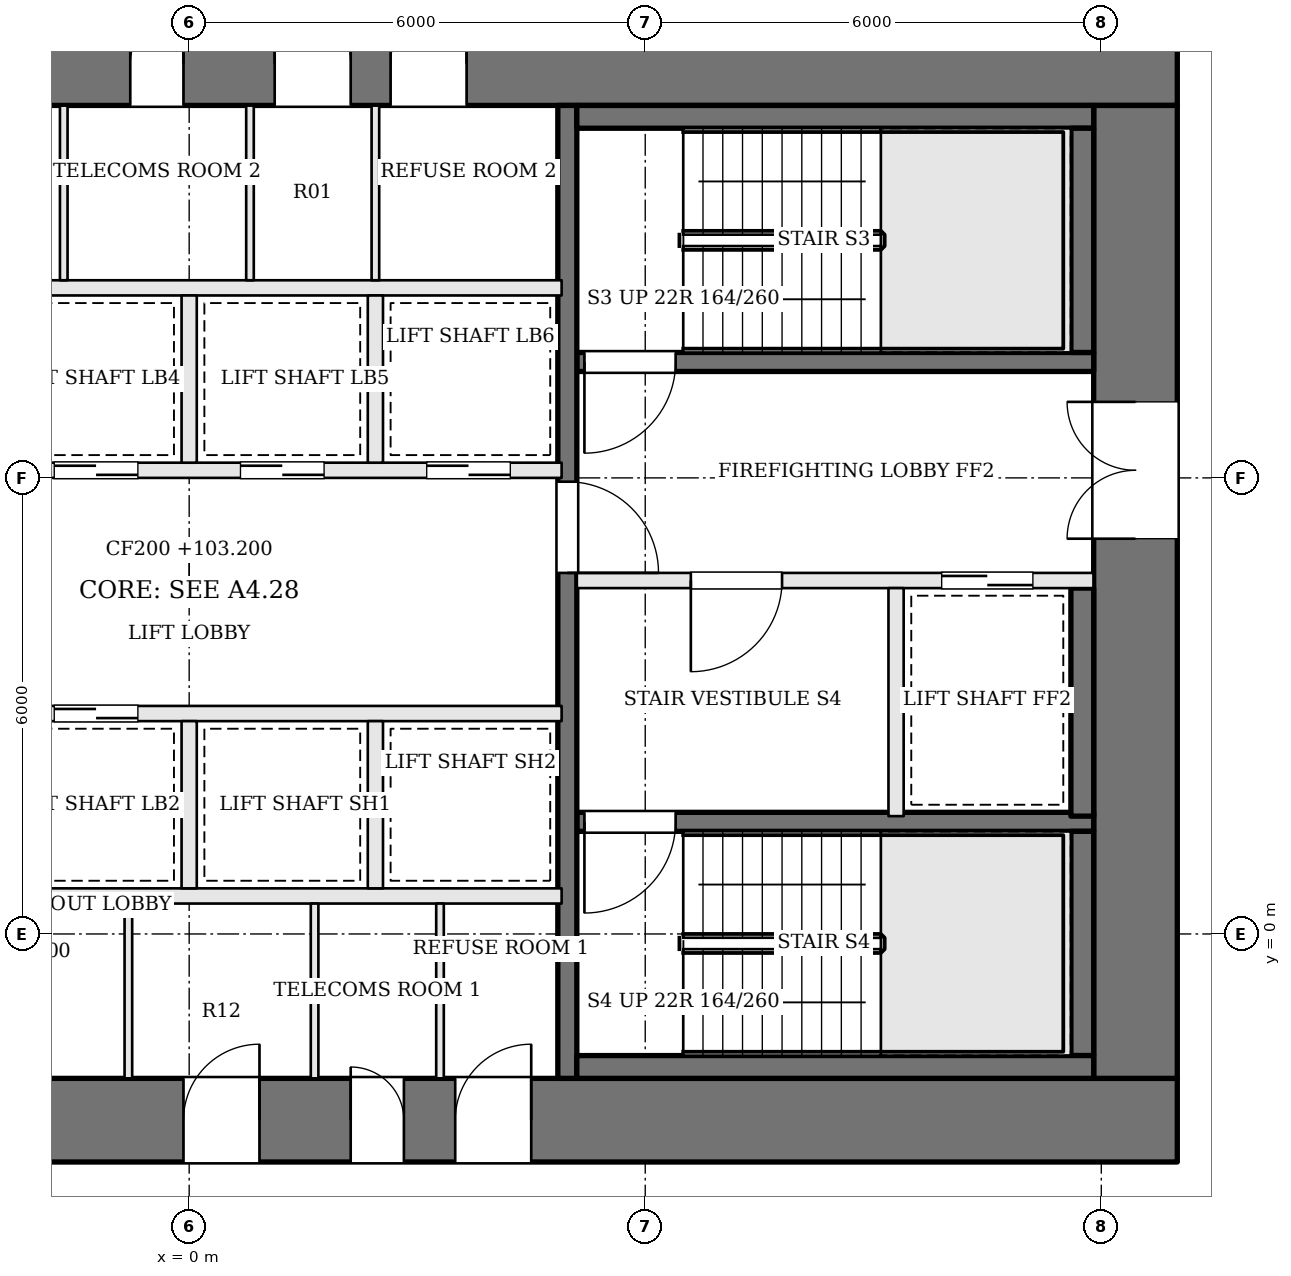
"""IFC4 building model, lengths in metres.
Left out: names, types, materials, properties, quantities, classifications, styles, units other than length and angle.
Written with IfcOpenShell. Run it as: python <this file> out.ifc"""

import sys

from ifc_helpers import new_model, si_unit, direction, frame, frame_2d, origin, place, context, subcontext, project, spatial, rectangle, extrude, element, fill, save


model = new_model("IFC4")
c1 = context("Model", 3, precision=1e-05, world=origin(), true_north=direction((0.0, 1.0)))
c2 = subcontext(c1, "Body", "Model", "MODEL_VIEW")
j1 = project(units=[si_unit("LENGTHUNIT", "METRE"), si_unit("PLANEANGLEUNIT", "RADIAN")], contexts=[c1])
p1 = place(None, origin())
s1 = spatial("IfcSite", under=j1, at=p1, CompositionType="ELEMENT")
p2 = place(p1, origin())
s2 = spatial("IfcBuilding", under=s1, at=p2, CompositionType="ELEMENT")
p3 = place(p2, frame((0.0, 0.0, 103.2)))
s3 = spatial("IfcBuildingStorey", under=s2, at=p3, CompositionType="ELEMENT", Elevation=103.2)
p4 = place(p3, frame((-13.0, 11.45, 0.0), z_axis=(0.0, 0.0, 1.0), x_axis=(1.0, 0.0, 0.0)))
e1 = element("IfcWall", 1, at=p4, inside=s3, PredefinedType="SHEAR", context=c2, shape_type="SweptSolid", body=[
    extrude(rectangle(XDim=26.0, YDim=1.1, at=frame_2d((13.0, 0.0))), origin(), (0.0, 0.0, 1.0), 3.6),
])
p5 = place(p4, frame((9.225, 0.0, 0.0)))
e2 = element("IfcOpeningElement", 2, at=p5, cuts=e1, PredefinedType="OPENING", context=c2, shape_type="SweptSolid", body=[
    extrude(rectangle(XDim=1.0, YDim=2.1, at=frame_2d((0.5, 1.05))), frame((0.0, 0.56, 0.0), z_axis=(0.0, -1.0, 0.0), x_axis=(1.0, 0.0, 0.0)), (0.0, 0.0, 1.0), 1.12),
])
p6 = place(p4, frame((12.225, 0.0, 0.0)))
e3 = element("IfcOpeningElement", 3, at=p6, cuts=e1, PredefinedType="OPENING", context=c2, shape_type="SweptSolid", body=[
    extrude(rectangle(XDim=0.7, YDim=2.1, at=frame_2d((0.35, 1.05))), frame((0.0, 0.56, 0.0), z_axis=(0.0, -1.0, 0.0), x_axis=(1.0, 0.0, 0.0)), (0.0, 0.0, 1.0), 1.12),
])
p7 = place(p4, frame((14.125, 0.0, 0.0)))
e4 = element("IfcOpeningElement", 4, at=p7, cuts=e1, PredefinedType="OPENING", context=c2, shape_type="SweptSolid", body=[
    extrude(rectangle(XDim=1.0, YDim=2.1, at=frame_2d((0.5, 1.05))), frame((0.0, 0.56, 0.0), z_axis=(0.0, -1.0, 0.0), x_axis=(1.0, 0.0, 0.0)), (0.0, 0.0, 1.0), 1.12),
])
p8 = place(p4, frame((15.65, 0.0, 0.0)))
e5 = element("IfcOpeningElement", 5, at=p8, cuts=e1, PredefinedType="OPENING", context=c2, shape_type="SweptSolid", body=[
    extrude(rectangle(XDim=1.0, YDim=2.1, at=frame_2d((0.5, 1.05))), frame((0.0, 0.56, 0.0), z_axis=(0.0, -1.0, 0.0), x_axis=(1.0, 0.0, 0.0)), (0.0, 0.0, 1.0), 1.12),
])
p9 = place(p3, frame((-13.0, -2.45, 0.0), z_axis=(0.0, 0.0, 1.0), x_axis=(1.0, 0.0, 0.0)))
e6 = element("IfcWall", 6, at=p9, inside=s3, PredefinedType="SHEAR", context=c2, shape_type="SweptSolid", body=[
    extrude(rectangle(XDim=26.0, YDim=1.1, at=frame_2d((13.0, 0.0))), origin(), (0.0, 0.0, 1.0), 3.6),
])
p10 = place(p9, frame((9.65, 0.0, 0.0)))
e7 = element("IfcOpeningElement", 7, at=p10, cuts=e6, PredefinedType="OPENING", context=c2, shape_type="SweptSolid", body=[
    extrude(rectangle(XDim=1.0, YDim=2.1, at=frame_2d((0.5, 1.05))), frame((0.0, 0.56, 0.0), z_axis=(0.0, -1.0, 0.0), x_axis=(1.0, 0.0, 0.0)), (0.0, 0.0, 1.0), 1.12),
])
p11 = place(p9, frame((12.925, 0.0, 0.0)))
e8 = element("IfcOpeningElement", 8, at=p11, cuts=e6, PredefinedType="OPENING", context=c2, shape_type="SweptSolid", body=[
    extrude(rectangle(XDim=1.0, YDim=2.1, at=frame_2d((0.5, 1.05))), frame((0.0, 0.56, 0.0), z_axis=(0.0, -1.0, 0.0), x_axis=(1.0, 0.0, 0.0)), (0.0, 0.0, 1.0), 1.12),
])
p12 = place(p9, frame((15.125, 0.0, 0.0)))
e9 = element("IfcOpeningElement", 9, at=p12, cuts=e6, PredefinedType="OPENING", context=c2, shape_type="SweptSolid", body=[
    extrude(rectangle(XDim=0.7, YDim=2.1, at=frame_2d((0.35, 1.05))), frame((0.0, 0.56, 0.0), z_axis=(0.0, -1.0, 0.0), x_axis=(1.0, 0.0, 0.0)), (0.0, 0.0, 1.0), 1.12),
])
p13 = place(p9, frame((16.5, 0.0, 0.0)))
e10 = element("IfcOpeningElement", 10, at=p13, cuts=e6, PredefinedType="OPENING", context=c2, shape_type="SweptSolid", body=[
    extrude(rectangle(XDim=1.0, YDim=2.1, at=frame_2d((0.5, 1.05))), frame((0.0, 0.56, 0.0), z_axis=(0.0, -1.0, 0.0), x_axis=(1.0, 0.0, 0.0)), (0.0, 0.0, 1.0), 1.12),
])
p14 = place(p3, frame((12.45, -1.9, 0.0), z_axis=(0.0, 0.0, 1.0), x_axis=(0.0, 1.0, 0.0)))
e11 = element("IfcWall", 11, at=p14, inside=s3, PredefinedType="SHEAR", context=c2, shape_type="SweptSolid", body=[
    extrude(rectangle(XDim=12.8, YDim=1.1, at=frame_2d((6.4, 0.0))), origin(), (0.0, 0.0, 1.0), 3.6),
])
p15 = place(p14, frame((7.1, 0.0, 0.0)))
e12 = element("IfcOpeningElement", 12, at=p15, cuts=e11, PredefinedType="OPENING", context=c2, shape_type="SweptSolid", body=[
    extrude(rectangle(XDim=1.8, YDim=2.1, at=frame_2d((0.9, 1.05))), frame((0.0, 0.56, 0.0), z_axis=(0.0, -1.0, 0.0), x_axis=(1.0, 0.0, 0.0)), (0.0, 0.0, 1.0), 1.12),
])
p16 = place(p3, frame((11.9, 7.525, 0.0), z_axis=(0.0, 0.0, 1.0), x_axis=(-1.0, 0.0, 0.0)))
e13 = element("IfcWall", 13, at=p16, inside=s3, PredefinedType="SOLIDWALL", context=c2, shape_type="SweptSolid", body=[
    extrude(rectangle(XDim=6.8, YDim=0.25, at=frame_2d((3.4, 0.0))), origin(), (0.0, 0.0, 1.0), 3.4),
])
p17 = place(p16, frame((5.5, 0.0, 0.0)))
e14 = element("IfcOpeningElement", 14, at=p17, cuts=e13, PredefinedType="OPENING", context=c2, shape_type="SweptSolid", body=[
    extrude(rectangle(XDim=1.2, YDim=2.1, at=frame_2d((0.6, 1.05))), frame((0.0, 0.135, 0.0), z_axis=(0.0, -1.0, 0.0), x_axis=(1.0, 0.0, 0.0)), (0.0, 0.0, 1.0), 0.27),
])
p18 = place(p3, frame((11.9, 4.65, 0.0), z_axis=(0.0, 0.0, 1.0), x_axis=(-1.0, 0.0, 0.0)))
e15 = element("IfcWall", 15, at=p18, inside=s3, PredefinedType="SOLIDWALL", context=c2, shape_type="SweptSolid", body=[
    extrude(rectangle(XDim=6.8, YDim=0.2, at=frame_2d((3.4, 0.0))), origin(), (0.0, 0.0, 1.0), 3.4),
])
p19 = place(p18, frame((4.1, 0.0, 0.0)))
e16 = element("IfcOpeningElement", 16, at=p19, cuts=e15, PredefinedType="OPENING", context=c2, shape_type="SweptSolid", body=[
    extrude(rectangle(XDim=1.2, YDim=2.1, at=frame_2d((0.6, 1.05))), frame((0.0, 0.11, 0.0), z_axis=(0.0, -1.0, 0.0), x_axis=(1.0, 0.0, 0.0)), (0.0, 0.0, 1.0), 0.22),
])
p20 = place(p18, frame((0.8, 0.0, 0.0)))
e17 = element("IfcOpeningElement", 17, at=p20, cuts=e15, PredefinedType="OPENING", context=c2, shape_type="SweptSolid", body=[
    extrude(rectangle(XDim=1.2, YDim=2.1, at=frame_2d((0.6, 1.05))), frame((0.0, 0.11, 0.0), z_axis=(0.0, -1.0, 0.0), x_axis=(1.0, 0.0, 0.0)), (0.0, 0.0, 1.0), 0.22),
])
p21 = place(p3, frame((11.9, 1.475, 0.0), z_axis=(0.0, 0.0, 1.0), x_axis=(-1.0, 0.0, 0.0)))
e18 = element("IfcWall", 18, at=p21, inside=s3, PredefinedType="SOLIDWALL", context=c2, shape_type="SweptSolid", body=[
    extrude(rectangle(XDim=6.8, YDim=0.25, at=frame_2d((3.4, 0.0))), origin(), (0.0, 0.0, 1.0), 3.4),
])
p22 = place(p21, frame((5.5, 0.0, 0.0)))
e19 = element("IfcOpeningElement", 19, at=p22, cuts=e18, PredefinedType="OPENING", context=c2, shape_type="SweptSolid", body=[
    extrude(rectangle(XDim=1.2, YDim=2.1, at=frame_2d((0.6, 1.05))), frame((0.0, 0.135, 0.0), z_axis=(0.0, -1.0, 0.0), x_axis=(1.0, 0.0, 0.0)), (0.0, 0.0, 1.0), 0.27),
])
p23 = place(p3, frame((9.3, 4.55, 0.0), z_axis=(0.0, 0.0, 1.0), x_axis=(0.0, -1.0, 0.0)))
e20 = element("IfcWall", 20, at=p23, inside=s3, PredefinedType="SOLIDWALL", context=c2, shape_type="SweptSolid", body=[
    extrude(rectangle(XDim=3.0, YDim=0.2, at=frame_2d((1.5, 0.0))), origin(), (0.0, 0.0, 1.0), 3.4),
])
p24 = place(p3, frame((4.975, 10.9, 0.0), z_axis=(0.0, 0.0, 1.0), x_axis=(0.0, -1.0, 0.0)))
e21 = element("IfcWall", 21, at=p24, inside=s3, PredefinedType="SOLIDWALL", context=c2, shape_type="SweptSolid", body=[
    extrude(rectangle(XDim=12.8, YDim=0.25, at=frame_2d((6.4, 0.0))), origin(), (0.0, 0.0, 1.0), 3.4),
])
p25 = place(p24, frame((4.95, 0.0, 0.0)))
e22 = element("IfcOpeningElement", 22, at=p25, cuts=e21, PredefinedType="OPENING", context=c2, shape_type="SweptSolid", body=[
    extrude(rectangle(XDim=1.2, YDim=2.1, at=frame_2d((0.6, 1.05))), frame((0.0, 0.135, 0.0), z_axis=(0.0, -1.0, 0.0), x_axis=(1.0, 0.0, 0.0)), (0.0, 0.0, 1.0), 0.27),
])
p26 = place(p3, frame((11.9, 10.75, 0.0), z_axis=(0.0, 0.0, 1.0), x_axis=(-1.0, 0.0, 0.0)))
e23 = element("IfcWall", 23, at=p26, inside=s3, PredefinedType="SOLIDWALL", context=c2, shape_type="SweptSolid", body=[
    extrude(rectangle(XDim=6.8, YDim=0.3, at=frame_2d((3.4, 0.0))), origin(), (0.0, 0.0, 1.0), 3.4),
])
p27 = place(p3, frame((11.75, 10.6, 0.0), z_axis=(0.0, 0.0, 1.0), x_axis=(0.0, -1.0, 0.0)))
e24 = element("IfcWall", 24, at=p27, inside=s3, PredefinedType="SOLIDWALL", context=c2, shape_type="SweptSolid", body=[
    extrude(rectangle(XDim=2.95, YDim=0.3, at=frame_2d((1.475, 0.0))), origin(), (0.0, 0.0, 1.0), 3.4),
])
p28 = place(p3, frame((11.75, 4.55, 0.0), z_axis=(0.0, 0.0, 1.0), x_axis=(0.0, -1.0, 0.0)))
e25 = element("IfcWall", 25, at=p28, inside=s3, PredefinedType="SOLIDWALL", context=c2, shape_type="SweptSolid", body=[
    extrude(rectangle(XDim=3.0, YDim=0.3, at=frame_2d((1.5, 0.0))), origin(), (0.0, 0.0, 1.0), 3.4),
])
p29 = place(p3, frame((11.75, 1.35, 0.0), z_axis=(0.0, 0.0, 1.0), x_axis=(0.0, -1.0, 0.0)))
e26 = element("IfcWall", 26, at=p29, inside=s3, PredefinedType="SOLIDWALL", context=c2, shape_type="SweptSolid", body=[
    extrude(rectangle(XDim=2.95, YDim=0.3, at=frame_2d((1.475, 0.0))), origin(), (0.0, 0.0, 1.0), 3.4),
])
p30 = place(p3, frame((11.9, -1.75, 0.0), z_axis=(0.0, 0.0, 1.0), x_axis=(-1.0, 0.0, 0.0)))
e27 = element("IfcWall", 27, at=p30, inside=s3, PredefinedType="SOLIDWALL", context=c2, shape_type="SweptSolid", body=[
    extrude(rectangle(XDim=6.8, YDim=0.3, at=frame_2d((3.4, 0.0))), origin(), (0.0, 0.0, 1.0), 3.4),
])
p31 = place(p3, frame((-4.9, 0.5, 0.0), z_axis=(0.0, 0.0, 1.0), x_axis=(1.0, 0.0, 0.0)))
e28 = element("IfcWall", 28, at=p31, inside=s3, PredefinedType="SOLIDWALL", context=c2, shape_type="SweptSolid", body=[
    extrude(rectangle(XDim=9.8, YDim=0.2, at=frame_2d((4.9, 0.0))), origin(), (0.0, 0.0, 1.0), 3.4),
])
p32 = place(p3, frame((-4.9, 2.9, 0.0), z_axis=(0.0, 0.0, 1.0), x_axis=(1.0, 0.0, 0.0)))
e29 = element("IfcWall", 29, at=p32, inside=s3, PredefinedType="SOLIDWALL", context=c2, shape_type="SweptSolid", body=[
    extrude(rectangle(XDim=9.8, YDim=0.2, at=frame_2d((4.9, 0.0))), origin(), (0.0, 0.0, 1.0), 3.4),
])
p33 = place(p32, frame((0.675, 0.0, 0.0)))
e30 = element("IfcOpeningElement", 30, at=p33, cuts=e29, PredefinedType="OPENING", context=c2, shape_type="SweptSolid", body=[
    extrude(rectangle(XDim=1.1, YDim=2.1, at=frame_2d((0.55, 1.05))), frame((0.0, 0.11, 0.0), z_axis=(0.0, -1.0, 0.0), x_axis=(1.0, 0.0, 0.0)), (0.0, 0.0, 1.0), 0.22),
])
p34 = place(p32, frame((3.125, 0.0, 0.0)))
e31 = element("IfcOpeningElement", 31, at=p34, cuts=e29, PredefinedType="OPENING", context=c2, shape_type="SweptSolid", body=[
    extrude(rectangle(XDim=1.1, YDim=2.1, at=frame_2d((0.55, 1.05))), frame((0.0, 0.11, 0.0), z_axis=(0.0, -1.0, 0.0), x_axis=(1.0, 0.0, 0.0)), (0.0, 0.0, 1.0), 0.22),
])
p35 = place(p3, frame((-4.9, 6.1, 0.0), z_axis=(0.0, 0.0, 1.0), x_axis=(1.0, 0.0, 0.0)))
e32 = element("IfcWall", 32, at=p35, inside=s3, PredefinedType="SOLIDWALL", context=c2, shape_type="SweptSolid", body=[
    extrude(rectangle(XDim=9.8, YDim=0.2, at=frame_2d((4.9, 0.0))), origin(), (0.0, 0.0, 1.0), 3.4),
])
p36 = place(p35, frame((0.675, 0.0, 0.0)))
e33 = element("IfcOpeningElement", 33, at=p36, cuts=e32, PredefinedType="OPENING", context=c2, shape_type="SweptSolid", body=[
    extrude(rectangle(XDim=1.1, YDim=2.1, at=frame_2d((0.55, 1.05))), frame((0.0, 0.11, 0.0), z_axis=(0.0, -1.0, 0.0), x_axis=(1.0, 0.0, 0.0)), (0.0, 0.0, 1.0), 0.22),
])
p37 = place(p35, frame((3.125, 0.0, 0.0)))
e34 = element("IfcOpeningElement", 34, at=p37, cuts=e32, PredefinedType="OPENING", context=c2, shape_type="SweptSolid", body=[
    extrude(rectangle(XDim=1.1, YDim=2.1, at=frame_2d((0.55, 1.05))), frame((0.0, 0.11, 0.0), z_axis=(0.0, -1.0, 0.0), x_axis=(1.0, 0.0, 0.0)), (0.0, 0.0, 1.0), 0.22),
])
p38 = place(p35, frame((5.575, 0.0, 0.0)))
e35 = element("IfcOpeningElement", 35, at=p38, cuts=e32, PredefinedType="OPENING", context=c2, shape_type="SweptSolid", body=[
    extrude(rectangle(XDim=1.1, YDim=2.1, at=frame_2d((0.55, 1.05))), frame((0.0, 0.11, 0.0), z_axis=(0.0, -1.0, 0.0), x_axis=(1.0, 0.0, 0.0)), (0.0, 0.0, 1.0), 0.22),
])
p39 = place(p35, frame((8.025, 0.0, 0.0)))
e36 = element("IfcOpeningElement", 36, at=p39, cuts=e32, PredefinedType="OPENING", context=c2, shape_type="SweptSolid", body=[
    extrude(rectangle(XDim=1.1, YDim=2.1, at=frame_2d((0.55, 1.05))), frame((0.0, 0.11, 0.0), z_axis=(0.0, -1.0, 0.0), x_axis=(1.0, 0.0, 0.0)), (0.0, 0.0, 1.0), 0.22),
])
p40 = place(p3, frame((-4.9, 8.5, 0.0), z_axis=(0.0, 0.0, 1.0), x_axis=(1.0, 0.0, 0.0)))
e37 = element("IfcWall", 37, at=p40, inside=s3, PredefinedType="SOLIDWALL", context=c2, shape_type="SweptSolid", body=[
    extrude(rectangle(XDim=9.8, YDim=0.2, at=frame_2d((4.9, 0.0))), origin(), (0.0, 0.0, 1.0), 3.4),
])
for number, where, z_axis, x_axis in (
    (38, (0.0, 0.6, 0.0), (0.0, 0.0, 1.0), (0.0, 1.0, 0.0)),
    (39, (2.45, 0.6, 0.0), (0.0, 0.0, 1.0), (0.0, 1.0, 0.0)),
    (40, (0.0, 6.2, 0.0), (0.0, 0.0, 1.0), (0.0, 1.0, 0.0)),
    (41, (2.45, 6.2, 0.0), (0.0, 0.0, 1.0), (0.0, 1.0, 0.0)),
):
    element("IfcWall", number, at=place(p3, frame(where, z_axis=z_axis, x_axis=x_axis)), inside=s3, PredefinedType="SOLIDWALL", context=c2, shape_type="SweptSolid", body=[
        extrude(rectangle(XDim=2.2, YDim=0.2, at=frame_2d((1.1, 0.0))), origin(), (0.0, 0.0, 1.0), 3.4),
    ])
for number, where, z_axis, x_axis in (
    (42, (-0.8, -1.9, 0.0), (0.0, 0.0, 1.0), (0.0, 1.0, 0.0)),
    (43, (1.65, -1.9, 0.0), (0.0, 0.0, 1.0), (0.0, 1.0, 0.0)),
    (44, (3.3, -1.9, 0.0), (0.0, 0.0, 1.0), (0.0, 1.0, 0.0)),
    (45, (-1.65, 8.6, 0.0), (0.0, 0.0, 1.0), (0.0, 1.0, 0.0)),
    (46, (0.8, 8.6, 0.0), (0.0, 0.0, 1.0), (0.0, 1.0, 0.0)),
    (47, (2.45, 8.6, 0.0), (0.0, 0.0, 1.0), (0.0, 1.0, 0.0)),
):
    element("IfcWall", number, at=place(p3, frame(where, z_axis=z_axis, x_axis=x_axis)), inside=s3, PredefinedType="PARTITIONING", context=c2, shape_type="SweptSolid", body=[
        extrude(rectangle(XDim=2.3, YDim=0.1, at=frame_2d((1.15, 0.0))), origin(), (0.0, 0.0, 1.0), 3.4),
    ])
p41 = place(p15, origin())
e48 = element("IfcDoor", 48, at=p41, inside=s3, OperationType="DOUBLE_DOOR_SINGLE_SWING", PredefinedType="DOOR", context=c2, shape_type="SweptSolid", body=[
    extrude(rectangle(XDim=1.8, YDim=2.1, at=frame_2d((0.9, 1.05))), frame((0.0, 0.025, 0.0), z_axis=(0.0, -1.0, 0.0), x_axis=(1.0, 0.0, 0.0)), (0.0, 0.0, 1.0), 0.05),
])
fill(e12, e48)
p42 = place(p25, origin())
e49 = element("IfcDoor", 49, at=p42, inside=s3, OperationType="SINGLE_SWING_RIGHT", PredefinedType="DOOR", context=c2, shape_type="SweptSolid", body=[
    extrude(rectangle(XDim=1.2, YDim=2.1, at=frame_2d((0.6, 1.05))), frame((0.0, 0.025, 0.0), z_axis=(0.0, -1.0, 0.0), x_axis=(1.0, 0.0, 0.0)), (0.0, 0.0, 1.0), 0.05),
])
fill(e22, e49)
p43 = place(p19, origin())
e50 = element("IfcDoor", 50, at=p43, inside=s3, OperationType="SINGLE_SWING_RIGHT", PredefinedType="DOOR", context=c2, shape_type="SweptSolid", body=[
    extrude(rectangle(XDim=1.2, YDim=2.1, at=frame_2d((0.6, 1.05))), frame((0.0, 0.025, 0.0), z_axis=(0.0, -1.0, 0.0), x_axis=(1.0, 0.0, 0.0)), (0.0, 0.0, 1.0), 0.05),
])
fill(e16, e50)
p44 = place(p17, origin())
e51 = element("IfcDoor", 51, at=p44, inside=s3, OperationType="SINGLE_SWING_RIGHT", PredefinedType="DOOR", context=c2, shape_type="SweptSolid", body=[
    extrude(rectangle(XDim=1.2, YDim=2.1, at=frame_2d((0.6, 1.05))), frame((0.0, 0.025, 0.0), z_axis=(0.0, -1.0, 0.0), x_axis=(1.0, 0.0, 0.0)), (0.0, 0.0, 1.0), 0.05),
])
fill(e14, e51)
p45 = place(p22, origin())
e52 = element("IfcDoor", 52, at=p45, inside=s3, OperationType="SINGLE_SWING_RIGHT", PredefinedType="DOOR", context=c2, shape_type="SweptSolid", body=[
    extrude(rectangle(XDim=1.2, YDim=2.1, at=frame_2d((0.6, 1.05))), frame((0.0, 0.025, 0.0), z_axis=(0.0, -1.0, 0.0), x_axis=(1.0, 0.0, 0.0)), (0.0, 0.0, 1.0), 0.05),
])
fill(e19, e52)
p46 = place(p20, origin())
e53 = element("IfcDoor", 53, at=p46, inside=s3, OperationType="SLIDING_TO_RIGHT", PredefinedType="DOOR", context=c2, shape_type="SweptSolid", body=[
    extrude(rectangle(XDim=1.2, YDim=2.1, at=frame_2d((0.6, 1.05))), frame((0.0, 0.025, 0.0), z_axis=(0.0, -1.0, 0.0), x_axis=(1.0, 0.0, 0.0)), (0.0, 0.0, 1.0), 0.05),
])
fill(e17, e53)
p47 = place(p34, origin())
e54 = element("IfcDoor", 54, at=p47, inside=s3, OperationType="SLIDING_TO_LEFT", PredefinedType="DOOR", context=c2, shape_type="SweptSolid", body=[
    extrude(rectangle(XDim=1.1, YDim=2.1, at=frame_2d((0.55, 1.05))), frame((0.0, 0.025, 0.0), z_axis=(0.0, -1.0, 0.0), x_axis=(1.0, 0.0, 0.0)), (0.0, 0.0, 1.0), 0.05),
])
fill(e31, e54)
p48 = place(p37, origin())
e55 = element("IfcDoor", 55, at=p48, inside=s3, OperationType="SLIDING_TO_LEFT", PredefinedType="DOOR", context=c2, shape_type="SweptSolid", body=[
    extrude(rectangle(XDim=1.1, YDim=2.1, at=frame_2d((0.55, 1.05))), frame((0.0, 0.025, 0.0), z_axis=(0.0, -1.0, 0.0), x_axis=(1.0, 0.0, 0.0)), (0.0, 0.0, 1.0), 0.05),
])
fill(e34, e55)
p49 = place(p38, origin())
e56 = element("IfcDoor", 56, at=p49, inside=s3, OperationType="SLIDING_TO_RIGHT", PredefinedType="DOOR", context=c2, shape_type="SweptSolid", body=[
    extrude(rectangle(XDim=1.1, YDim=2.1, at=frame_2d((0.55, 1.05))), frame((0.0, 0.025, 0.0), z_axis=(0.0, -1.0, 0.0), x_axis=(1.0, 0.0, 0.0)), (0.0, 0.0, 1.0), 0.05),
])
fill(e35, e56)
p50 = place(p39, origin())
e57 = element("IfcDoor", 57, at=p50, inside=s3, OperationType="SLIDING_TO_LEFT", PredefinedType="DOOR", context=c2, shape_type="SweptSolid", body=[
    extrude(rectangle(XDim=1.1, YDim=2.1, at=frame_2d((0.55, 1.05))), frame((0.0, 0.025, 0.0), z_axis=(0.0, -1.0, 0.0), x_axis=(1.0, 0.0, 0.0)), (0.0, 0.0, 1.0), 0.05),
])
fill(e36, e57)
p51 = place(p11, origin())
e58 = element("IfcDoor", 58, at=p51, inside=s3, OperationType="SINGLE_SWING_RIGHT", PredefinedType="DOOR", context=c2, shape_type="SweptSolid", body=[
    extrude(rectangle(XDim=1.0, YDim=2.1, at=frame_2d((0.5, 1.05))), frame((0.0, 0.025, 0.0), z_axis=(0.0, -1.0, 0.0), x_axis=(1.0, 0.0, 0.0)), (0.0, 0.0, 1.0), 0.05),
])
fill(e8, e58)
p52 = place(p12, origin())
e59 = element("IfcDoor", 59, at=p52, inside=s3, OperationType="SINGLE_SWING_LEFT", PredefinedType="DOOR", context=c2, shape_type="SweptSolid", body=[
    extrude(rectangle(XDim=0.7, YDim=2.1, at=frame_2d((0.35, 1.05))), frame((0.0, 0.025, 0.0), z_axis=(0.0, -1.0, 0.0), x_axis=(1.0, 0.0, 0.0)), (0.0, 0.0, 1.0), 0.05),
])
fill(e9, e59)
p53 = place(p13, origin())
e60 = element("IfcDoor", 60, at=p53, inside=s3, OperationType="SINGLE_SWING_RIGHT", PredefinedType="DOOR", context=c2, shape_type="SweptSolid", body=[
    extrude(rectangle(XDim=1.0, YDim=2.1, at=frame_2d((0.5, 1.05))), frame((0.0, 0.025, 0.0), z_axis=(0.0, -1.0, 0.0), x_axis=(1.0, 0.0, 0.0)), (0.0, 0.0, 1.0), 0.05),
])
fill(e10, e60)
p54 = place(p6, origin())
e61 = element("IfcDoor", 61, at=p54, inside=s3, OperationType="SINGLE_SWING_RIGHT", PredefinedType="DOOR", context=c2, shape_type="SweptSolid", body=[
    extrude(rectangle(XDim=0.7, YDim=2.1, at=frame_2d((0.35, 1.05))), frame((0.0, 0.025, 0.0), z_axis=(0.0, -1.0, 0.0), x_axis=(1.0, 0.0, 0.0)), (0.0, 0.0, 1.0), 0.05),
])
fill(e3, e61)
p55 = place(p7, origin())
e62 = element("IfcDoor", 62, at=p55, inside=s3, OperationType="SINGLE_SWING_LEFT", PredefinedType="DOOR", context=c2, shape_type="SweptSolid", body=[
    extrude(rectangle(XDim=1.0, YDim=2.1, at=frame_2d((0.5, 1.05))), frame((0.0, 0.025, 0.0), z_axis=(0.0, -1.0, 0.0), x_axis=(1.0, 0.0, 0.0)), (0.0, 0.0, 1.0), 0.05),
])
fill(e4, e62)
p56 = place(p8, origin())
e63 = element("IfcDoor", 63, at=p56, inside=s3, OperationType="SINGLE_SWING_RIGHT", PredefinedType="DOOR", context=c2, shape_type="SweptSolid", body=[
    extrude(rectangle(XDim=1.0, YDim=2.1, at=frame_2d((0.5, 1.05))), frame((0.0, 0.025, 0.0), z_axis=(0.0, -1.0, 0.0), x_axis=(1.0, 0.0, 0.0)), (0.0, 0.0, 1.0), 0.05),
])
fill(e5, e63)
save(model, sys.argv[1])
